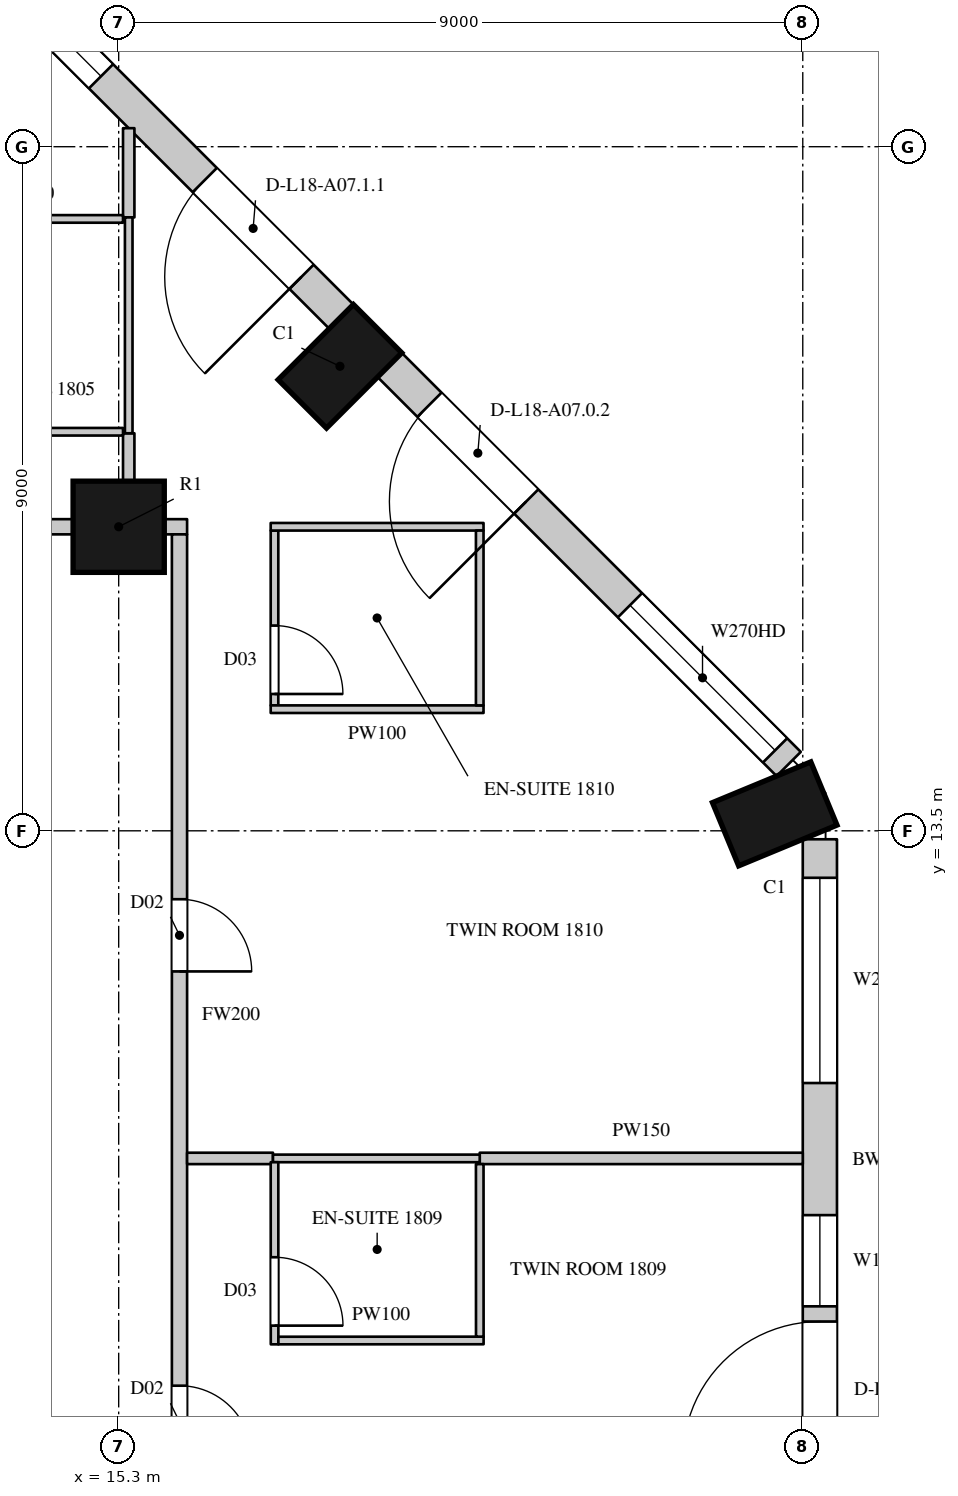
"""IFC4 building model, lengths in metres.
Left out: names, types, materials, properties, quantities, classifications, styles, units other than length and angle.
Written with IfcOpenShell. Run it as: python <this file> out.ifc"""

import sys

from ifc_helpers import new_model, si_unit, direction, frame, frame_2d, origin, origin_2d, place, context, subcontext, project, spatial, rectangle, circle, extrude, element, fill, save


model = new_model("IFC4")
c1 = context("Model", 3, precision=1e-05, world=origin(), true_north=direction((0.0, 1.0)))
c2 = subcontext(c1, "Body", "Model", "MODEL_VIEW")
j1 = project(units=[si_unit("LENGTHUNIT", "METRE"), si_unit("PLANEANGLEUNIT", "RADIAN")], contexts=[c1])
p1 = place(None, origin())
s1 = spatial("IfcSite", under=j1, at=p1, CompositionType="ELEMENT")
p2 = place(p1, origin())
s2 = spatial("IfcBuilding", under=s1, at=p2, CompositionType="ELEMENT")
p3 = place(p2, frame((0.0, 0.0, 95.1)))
s3 = spatial("IfcBuildingStorey", under=s2, at=p3, CompositionType="ELEMENT", Elevation=95.1)
for number, where, z_axis, x_axis in (
    (1, (23.931, 13.723, 0.0), (0.0, 0.0, 1.0), (-0.383, 0.924, 0.0)),
    (2, (18.211, 19.611, 0.0), (0.0, 0.0, 1.0), (-0.707, 0.707, 0.0)),
):
    element("IfcColumn", number, at=place(p3, frame(where, z_axis=z_axis, x_axis=x_axis)), inside=s3, PredefinedType="COLUMN", context=c2, shape_type="SweptSolid", body=[
        extrude(rectangle(XDim=0.9, YDim=1.4, at=origin_2d()), origin(), (0.0, 0.0, 1.0), 3.6),
    ])
p4 = place(p3, frame((15.3, 17.5, 0.0), z_axis=(0.0, 0.0, 1.0), x_axis=(1.0, 0.0, 0.0)))
e3 = element("IfcColumn", 3, at=p4, inside=s3, PredefinedType="COLUMN", context=c2, shape_type="SweptSolid", body=[
    extrude(circle(Radius=0.6, at=origin_2d()), origin(), (0.0, 0.0, 1.0), 3.6),
])
p5 = place(p3, frame((24.525, 4.95, 0.0), z_axis=(0.0, 0.0, 1.0), x_axis=(0.0, 1.0, 0.0)))
e4 = element("IfcWall", 4, at=p5, inside=s3, PredefinedType="SOLIDWALL", context=c2, shape_type="SweptSolid", body=[
    extrude(rectangle(XDim=8.439, YDim=0.45, at=frame_2d((4.219, 0.0))), origin(), (0.0, 0.0, 1.0), 3.3),
])
p6 = place(p5, frame((0.294, 0.0, 0.0)))
e5 = element("IfcOpeningElement", 5, at=p6, cuts=e4, PredefinedType="OPENING", context=c2, shape_type="SweptSolid", body=[
    extrude(rectangle(XDim=1.8, YDim=2.4, at=frame_2d((0.9, 1.2))), frame((0.0, 0.235, 0.0), z_axis=(0.0, -1.0, 0.0), x_axis=(1.0, 0.0, 0.0)), (0.0, 0.0, 1.0), 0.47),
])
p7 = place(p5, frame((2.294, 0.0, 1.05)))
e6 = element("IfcOpeningElement", 6, at=p7, cuts=e4, PredefinedType="OPENING", context=c2, shape_type="SweptSolid", body=[
    extrude(rectangle(XDim=1.2, YDim=2.0, at=frame_2d((0.6, 1.0))), frame((0.0, 0.235, 0.0), z_axis=(0.0, -1.0, 0.0), x_axis=(1.0, 0.0, 0.0)), (0.0, 0.0, 1.0), 0.47),
])
p8 = place(p5, frame((5.232, 0.0, 1.05)))
e7 = element("IfcOpeningElement", 7, at=p8, cuts=e4, PredefinedType="OPENING", context=c2, shape_type="SweptSolid", body=[
    extrude(rectangle(XDim=2.7, YDim=2.0, at=frame_2d((1.35, 1.0))), frame((0.0, 0.235, 0.0), z_axis=(0.0, -1.0, 0.0), x_axis=(1.0, 0.0, 0.0)), (0.0, 0.0, 1.0), 0.47),
])
p9 = place(p3, frame((24.115, 14.379, 0.0), z_axis=(0.0, 0.0, 1.0), x_axis=(-0.707106781187, 0.707106781187, 0.0)))
e8 = element("IfcWall", 8, at=p9, inside=s3, PredefinedType="SOLIDWALL", context=c2, shape_type="SweptSolid", body=[
    extrude(rectangle(XDim=7.424, YDim=0.45, at=frame_2d((3.712, 0.0))), origin(), (0.0, 0.0, 1.0), 3.3),
])
p10 = place(p9, frame((0.253, 0.0, 1.05)))
e9 = element("IfcOpeningElement", 9, at=p10, cuts=e8, PredefinedType="OPENING", context=c2, shape_type="SweptSolid", body=[
    extrude(rectangle(XDim=2.7, YDim=2.0, at=frame_2d((1.35, 1.0))), frame((0.0, 0.235, 0.0), z_axis=(0.0, -1.0, 0.0), x_axis=(1.0, 0.0, 0.0)), (0.0, 0.0, 1.0), 0.47),
])
p11 = place(p9, frame((4.884, 0.0, 0.0)))
e10 = element("IfcOpeningElement", 10, at=p11, cuts=e8, PredefinedType="OPENING", context=c2, shape_type="SweptSolid", body=[
    extrude(rectangle(XDim=1.8, YDim=2.4, at=frame_2d((0.9, 1.2))), frame((0.0, 0.235, 0.0), z_axis=(0.0, -1.0, 0.0), x_axis=(1.0, 0.0, 0.0)), (0.0, 0.0, 1.0), 0.47),
])
p12 = place(p3, frame((18.229, 20.265, 0.0), z_axis=(0.0, 0.0, 1.0), x_axis=(-0.707106781187, 0.707106781187, 0.0)))
e11 = element("IfcWall", 11, at=p12, inside=s3, PredefinedType="SOLIDWALL", context=c2, shape_type="SweptSolid", body=[
    extrude(rectangle(XDim=7.424, YDim=0.45, at=frame_2d((3.712, 0.0))), origin(), (0.0, 0.0, 1.0), 3.3),
])
p13 = place(p12, frame((0.74, 0.0, 0.0)))
e12 = element("IfcOpeningElement", 12, at=p13, cuts=e11, PredefinedType="OPENING", context=c2, shape_type="SweptSolid", body=[
    extrude(rectangle(XDim=1.8, YDim=2.4, at=frame_2d((0.9, 1.2))), frame((0.0, 0.235, 0.0), z_axis=(0.0, -1.0, 0.0), x_axis=(1.0, 0.0, 0.0)), (0.0, 0.0, 1.0), 0.47),
])
p14 = place(p12, frame((4.471, 0.0, 1.05)))
e13 = element("IfcOpeningElement", 13, at=p14, cuts=e11, PredefinedType="OPENING", context=c2, shape_type="SweptSolid", body=[
    extrude(rectangle(XDim=2.7, YDim=2.0, at=frame_2d((1.35, 1.0))), frame((0.0, 0.235, 0.0), z_axis=(0.0, -1.0, 0.0), x_axis=(1.0, 0.0, 0.0)), (0.0, 0.0, 1.0), 0.47),
])
p15 = place(p3, frame((23.15, 16.864, 0.0), z_axis=(0.0, 0.0, 1.0), x_axis=(-0.707106781187, 0.707106781187, 0.0)))
e14 = element("IfcWall", 14, at=p15, inside=s3, PredefinedType="SOLIDWALL", context=c2, shape_type="SweptSolid", body=[
    extrude(rectangle(XDim=1.445, YDim=0.45, at=frame_2d((0.722, 0.0))), origin(), (0.0, 0.0, 1.0), 0.6),
])
p16 = place(p3, frame((19.937, 20.078, 0.0), z_axis=(0.0, 0.0, 1.0), x_axis=(-0.707106781187, 0.707106781187, 0.0)))
e15 = element("IfcWall", 15, at=p16, inside=s3, PredefinedType="SOLIDWALL", context=c2, shape_type="SweptSolid", body=[
    extrude(rectangle(XDim=1.781, YDim=0.45, at=frame_2d((0.89, 0.0))), origin(), (0.0, 0.0, 1.0), 0.6),
])
p17 = place(p3, frame((16.486, 23.529, 0.0), z_axis=(0.0, 0.0, 1.0), x_axis=(-0.707022305137, 0.707191247145, 0.0)))
e16 = element("IfcWall", 16, at=p17, inside=s3, PredefinedType="SOLIDWALL", context=c2, shape_type="SweptSolid", body=[
    extrude(rectangle(XDim=1.445, YDim=0.45, at=frame_2d((0.723, 0.0))), origin(), (0.0, 0.0, 1.0), 0.6),
])
p18 = place(p3, frame((6.9, 17.5, 0.0), z_axis=(0.0, 0.0, 1.0), x_axis=(1.0, 0.0, 0.0)))
e17 = element("IfcWall", 17, at=p18, inside=s3, PredefinedType="PARTITIONING", context=c2, shape_type="SweptSolid", body=[
    extrude(rectangle(XDim=7.8, YDim=0.2, at=frame_2d((3.9, 0.0))), origin(), (0.0, 0.0, 1.0), 2.75),
])
p19 = place(p18, frame((1.45, 0.0, 0.0)))
e18 = element("IfcOpeningElement", 18, at=p19, cuts=e17, PredefinedType="OPENING", context=c2, shape_type="SweptSolid", body=[
    extrude(rectangle(XDim=1.1, YDim=2.4, at=frame_2d((0.55, 1.2))), frame((0.0, 0.11, 0.0), z_axis=(0.0, -1.0, 0.0), x_axis=(1.0, 0.0, 0.0)), (0.0, 0.0, 1.0), 0.22),
])
p20 = place(p3, frame((15.9, 17.5, 0.0), z_axis=(0.0, 0.0, 1.0), x_axis=(1.0, 0.0, 0.0)))
e19 = element("IfcWall", 19, at=p20, inside=s3, PredefinedType="PARTITIONING", context=c2, shape_type="SweptSolid", body=[
    extrude(rectangle(XDim=0.3, YDim=0.2, at=frame_2d((0.15, 0.0))), origin(), (0.0, 0.0, 1.0), 3.3),
])
p21 = place(p3, frame((16.1, 4.75, 0.0), z_axis=(0.0, 0.0, 1.0), x_axis=(0.0, 1.0, 0.0)))
e20 = element("IfcWall", 20, at=p21, inside=s3, PredefinedType="PARTITIONING", context=c2, shape_type="SweptSolid", body=[
    extrude(rectangle(XDim=12.65, YDim=0.2, at=frame_2d((6.325, 0.0))), origin(), (0.0, 0.0, 1.0), 3.3),
])
p22 = place(p21, frame((0.5, 0.0, 0.0)))
e21 = element("IfcOpeningElement", 21, at=p22, cuts=e20, PredefinedType="OPENING", context=c2, shape_type="SweptSolid", body=[
    extrude(rectangle(XDim=0.95, YDim=2.2, at=frame_2d((0.475, 1.1))), frame((0.0, 0.11, 0.0), z_axis=(0.0, -1.0, 0.0), x_axis=(1.0, 0.0, 0.0)), (0.0, 0.0, 1.0), 0.22),
])
p23 = place(p21, frame((6.9, 0.0, 0.0)))
e22 = element("IfcOpeningElement", 22, at=p23, cuts=e20, PredefinedType="OPENING", context=c2, shape_type="SweptSolid", body=[
    extrude(rectangle(XDim=0.95, YDim=2.2, at=frame_2d((0.475, 1.1))), frame((0.0, 0.11, 0.0), z_axis=(0.0, -1.0, 0.0), x_axis=(1.0, 0.0, 0.0)), (0.0, 0.0, 1.0), 0.22),
])
p24 = place(p3, frame((15.432, 18.094, 0.0), z_axis=(0.0, 0.0, 1.0), x_axis=(0.0, 1.0, 0.0)))
e23 = element("IfcWall", 23, at=p24, inside=s3, PredefinedType="PARTITIONING", context=c2, shape_type="SweptSolid", body=[
    extrude(rectangle(XDim=0.636, YDim=0.15, at=frame_2d((0.318, 0.0))), origin(), (0.0, 0.0, 1.0), 3.3),
])
p25 = place(p3, frame((15.432, 21.57, 0.0), z_axis=(0.0, 0.0, 1.0), x_axis=(0.0, 1.0, 0.0)))
e24 = element("IfcWall", 24, at=p25, inside=s3, PredefinedType="PARTITIONING", context=c2, shape_type="SweptSolid", body=[
    extrude(rectangle(XDim=1.174, YDim=0.15, at=frame_2d((0.587, 0.0))), origin(), (0.0, 0.0, 1.0), 3.3),
])
p26 = place(p3, frame((16.2, 9.19, 0.0), z_axis=(0.0, 0.0, 1.0), x_axis=(1.0, 0.0, 0.0)))
e25 = element("IfcWall", 25, at=p26, inside=s3, PredefinedType="PARTITIONING", context=c2, shape_type="SweptSolid", body=[
    extrude(rectangle(XDim=1.13, YDim=0.15, at=frame_2d((0.565, 0.0))), origin(), (0.0, 0.0, 1.0), 2.65),
])
p27 = place(p3, frame((20.05, 9.19, 0.0), z_axis=(0.0, 0.0, 1.0), x_axis=(1.0, 0.0, 0.0)))
e26 = element("IfcWall", 26, at=p27, inside=s3, PredefinedType="PARTITIONING", context=c2, shape_type="SweptSolid", body=[
    extrude(rectangle(XDim=4.25, YDim=0.15, at=frame_2d((2.125, 0.0))), origin(), (0.0, 0.0, 1.0), 2.65),
])
for number, where, z_axis, x_axis in (
    (27, (12.786, 18.75, 0.0), (0.0, 0.0, 1.0), (1.0, 0.0, 0.0)),
    (28, (12.786, 21.55, 0.0), (0.0, 0.0, 1.0), (1.0, 0.0, 0.0)),
):
    element("IfcWall", number, at=place(p3, frame(where, z_axis=z_axis, x_axis=x_axis)), inside=s3, PredefinedType="PARTITIONING", context=c2, shape_type="SweptSolid", body=[
        extrude(rectangle(XDim=2.571, YDim=0.1, at=frame_2d((1.286, 0.0))), origin(), (0.0, 0.0, 1.0), 3.3),
    ])
p28 = place(p3, frame((15.432, 18.73, 0.0), z_axis=(0.0, 0.0, 1.0), x_axis=(0.0, 1.0, 0.0)))
e29 = element("IfcWall", 29, at=p28, inside=s3, PredefinedType="PARTITIONING", context=c2, shape_type="SweptSolid", body=[
    extrude(rectangle(XDim=2.84, YDim=0.1, at=frame_2d((1.42, 0.0))), origin(), (0.0, 0.0, 1.0), 3.3),
])
p29 = place(p3, frame((17.33, 9.19, 0.0), z_axis=(0.0, 0.0, 1.0), x_axis=(1.0, 0.0, 0.0)))
e30 = element("IfcWall", 30, at=p29, inside=s3, PredefinedType="PARTITIONING", context=c2, shape_type="SweptSolid", body=[
    extrude(rectangle(XDim=2.72, YDim=0.1, at=frame_2d((1.36, 0.0))), origin(), (0.0, 0.0, 1.0), 2.65),
])
p30 = place(p3, frame((17.35, 9.14, 0.0), z_axis=(0.0, 0.0, 1.0), x_axis=(0.000407580973, -0.999999916939, 0.0)))
e31 = element("IfcWall", 31, at=p30, inside=s3, PredefinedType="PARTITIONING", context=c2, shape_type="SweptSolid", body=[
    extrude(rectangle(XDim=2.396, YDim=0.1, at=frame_2d((1.198, 0.0))), origin(), (0.0, 0.0, 1.0), 3.3),
])
p31 = place(p30, frame((1.25, 0.0, 0.0)))
e32 = element("IfcOpeningElement", 32, at=p31, cuts=e31, PredefinedType="OPENING", context=c2, shape_type="SweptSolid", body=[
    extrude(rectangle(XDim=0.9, YDim=2.2, at=frame_2d((0.45, 1.1))), frame((0.0, 0.06, 0.0), z_axis=(0.0, -1.0, 0.0), x_axis=(1.0, 0.0, 0.0)), (0.0, 0.0, 1.0), 0.12),
])
p32 = place(p3, frame((17.35, 15.15, 0.0), z_axis=(0.0, 0.0, 1.0), x_axis=(0.0, 1.0, 0.0)))
e33 = element("IfcWall", 33, at=p32, inside=s3, PredefinedType="PARTITIONING", context=c2, shape_type="SweptSolid", body=[
    extrude(rectangle(XDim=2.3, YDim=0.1, at=frame_2d((1.15, 0.0))), origin(), (0.0, 0.0, 1.0), 3.3),
])
p33 = place(p32, frame((0.15, 0.0, 0.0)))
e34 = element("IfcOpeningElement", 34, at=p33, cuts=e33, PredefinedType="OPENING", context=c2, shape_type="SweptSolid", body=[
    extrude(rectangle(XDim=0.9, YDim=2.2, at=frame_2d((0.45, 1.1))), frame((0.0, 0.06, 0.0), z_axis=(0.0, -1.0, 0.0), x_axis=(1.0, 0.0, 0.0)), (0.0, 0.0, 1.0), 0.12),
])
for number, where, z_axis, x_axis in (
    (35, (17.3, 15.1, 0.0), (0.0, 0.0, 1.0), (1.0, 0.0, 0.0)),
    (36, (17.3, 17.5, 0.0), (0.0, 0.0, 1.0), (1.0, 0.0, 0.0)),
):
    element("IfcWall", number, at=place(p3, frame(where, z_axis=z_axis, x_axis=x_axis)), inside=s3, PredefinedType="PARTITIONING", context=c2, shape_type="SweptSolid", body=[
        extrude(rectangle(XDim=2.8, YDim=0.1, at=frame_2d((1.4, 0.0))), origin(), (0.0, 0.0, 1.0), 3.3),
    ])
p34 = place(p3, frame((17.401, 6.794, 0.0), z_axis=(0.0, 0.0, 1.0), x_axis=(0.9999999346, 0.000361663629, 0.0)))
e37 = element("IfcWall", 37, at=p34, inside=s3, PredefinedType="PARTITIONING", context=c2, shape_type="SweptSolid", body=[
    extrude(rectangle(XDim=2.7, YDim=0.1, at=frame_2d((1.35, 0.0))), origin(), (0.0, 0.0, 1.0), 3.3),
])
p35 = place(p3, frame((20.05, 9.115, 0.0), z_axis=(0.0, 0.0, 1.0), x_axis=(0.000430200003, -0.999999907464, 0.0)))
e38 = element("IfcWall", 38, at=p35, inside=s3, PredefinedType="PARTITIONING", context=c2, shape_type="SweptSolid", body=[
    extrude(rectangle(XDim=2.27, YDim=0.1, at=frame_2d((1.135, 0.0))), origin(), (0.0, 0.0, 1.0), 3.3),
])
p36 = place(p3, frame((20.05, 15.15, 0.0), z_axis=(0.0, 0.0, 1.0), x_axis=(0.0, 1.0, 0.0)))
e39 = element("IfcWall", 39, at=p36, inside=s3, PredefinedType="PARTITIONING", context=c2, shape_type="SweptSolid", body=[
    extrude(rectangle(XDim=2.3, YDim=0.1, at=frame_2d((1.15, 0.0))), origin(), (0.0, 0.0, 1.0), 3.3),
])
p37 = place(p6, origin())
e40 = element("IfcDoor", 40, at=p37, inside=s3, OperationType="SLIDING_TO_LEFT", PredefinedType="DOOR", context=c2, shape_type="SweptSolid", body=[
    extrude(rectangle(XDim=1.8, YDim=2.4, at=frame_2d((0.9, 1.2))), frame((0.0, 0.13, 0.0), z_axis=(0.0, -1.0, 0.0), x_axis=(1.0, 0.0, 0.0)), (0.0, 0.0, 1.0), 0.05),
])
fill(e5, e40)
p38 = place(p7, origin())
e41 = element("IfcWindow", 41, at=p38, inside=s3, PartitioningType="SINGLE_PANEL", PredefinedType="WINDOW", context=c2, shape_type="SweptSolid", body=[
    extrude(rectangle(XDim=1.2, YDim=2.0, at=frame_2d((0.6, 1.0))), frame((0.0, 0.135, 0.0), z_axis=(0.0, -1.0, 0.0), x_axis=(1.0, 0.0, 0.0)), (0.0, 0.0, 1.0), 0.06),
])
fill(e6, e41)
p39 = place(p8, origin())
e42 = element("IfcWindow", 42, at=p39, inside=s3, PartitioningType="SINGLE_PANEL", PredefinedType="WINDOW", context=c2, shape_type="SweptSolid", body=[
    extrude(rectangle(XDim=2.7, YDim=2.0, at=frame_2d((1.35, 1.0))), frame((0.0, 0.135, 0.0), z_axis=(0.0, -1.0, 0.0), x_axis=(1.0, 0.0, 0.0)), (0.0, 0.0, 1.0), 0.06),
])
fill(e7, e42)
p40 = place(p10, origin())
e43 = element("IfcWindow", 43, at=p40, inside=s3, PartitioningType="SINGLE_PANEL", PredefinedType="WINDOW", context=c2, shape_type="SweptSolid", body=[
    extrude(rectangle(XDim=2.7, YDim=2.0, at=frame_2d((1.35, 1.0))), frame((0.0, 0.135, 0.0), z_axis=(0.0, -1.0, 0.0), x_axis=(1.0, 0.0, 0.0)), (0.0, 0.0, 1.0), 0.06),
])
fill(e9, e43)
p41 = place(p11, origin())
e44 = element("IfcDoor", 44, at=p41, inside=s3, OperationType="SLIDING_TO_LEFT", PredefinedType="DOOR", context=c2, shape_type="SweptSolid", body=[
    extrude(rectangle(XDim=1.8, YDim=2.4, at=frame_2d((0.9, 1.2))), frame((0.0, 0.13, 0.0), z_axis=(0.0, -1.0, 0.0), x_axis=(1.0, 0.0, 0.0)), (0.0, 0.0, 1.0), 0.05),
])
fill(e10, e44)
p42 = place(p13, origin())
e45 = element("IfcDoor", 45, at=p42, inside=s3, OperationType="SLIDING_TO_LEFT", PredefinedType="DOOR", context=c2, shape_type="SweptSolid", body=[
    extrude(rectangle(XDim=1.8, YDim=2.4, at=frame_2d((0.9, 1.2))), frame((0.0, 0.13, 0.0), z_axis=(0.0, -1.0, 0.0), x_axis=(1.0, 0.0, 0.0)), (0.0, 0.0, 1.0), 0.05),
])
fill(e12, e45)
p43 = place(p14, origin())
e46 = element("IfcWindow", 46, at=p43, inside=s3, PartitioningType="SINGLE_PANEL", PredefinedType="WINDOW", context=c2, shape_type="SweptSolid", body=[
    extrude(rectangle(XDim=2.7, YDim=2.0, at=frame_2d((1.35, 1.0))), frame((0.0, 0.135, 0.0), z_axis=(0.0, -1.0, 0.0), x_axis=(1.0, 0.0, 0.0)), (0.0, 0.0, 1.0), 0.06),
])
fill(e13, e46)
p44 = place(p22, origin())
e47 = element("IfcDoor", 47, at=p44, inside=s3, OperationType="SINGLE_SWING_RIGHT", PredefinedType="DOOR", context=c2, shape_type="SweptSolid", body=[
    extrude(rectangle(XDim=0.95, YDim=2.2, at=frame_2d((0.475, 1.1))), frame((0.0, 0.025, 0.0), z_axis=(0.0, -1.0, 0.0), x_axis=(1.0, 0.0, 0.0)), (0.0, 0.0, 1.0), 0.05),
])
fill(e21, e47)
p45 = place(p31, origin())
e48 = element("IfcDoor", 48, at=p45, inside=s3, OperationType="SINGLE_SWING_RIGHT", PredefinedType="DOOR", context=c2, shape_type="SweptSolid", body=[
    extrude(rectangle(XDim=0.9, YDim=2.2, at=frame_2d((0.45, 1.1))), frame((0.0, 0.025, 0.0), z_axis=(0.0, -1.0, 0.0), x_axis=(1.0, 0.0, 0.0)), (0.0, 0.0, 1.0), 0.05),
])
fill(e32, e48)
p46 = place(p23, origin())
e49 = element("IfcDoor", 49, at=p46, inside=s3, OperationType="SINGLE_SWING_RIGHT", PredefinedType="DOOR", context=c2, shape_type="SweptSolid", body=[
    extrude(rectangle(XDim=0.95, YDim=2.2, at=frame_2d((0.475, 1.1))), frame((0.0, 0.025, 0.0), z_axis=(0.0, -1.0, 0.0), x_axis=(1.0, 0.0, 0.0)), (0.0, 0.0, 1.0), 0.05),
])
fill(e22, e49)
p47 = place(p33, origin())
e50 = element("IfcDoor", 50, at=p47, inside=s3, OperationType="SINGLE_SWING_RIGHT", PredefinedType="DOOR", context=c2, shape_type="SweptSolid", body=[
    extrude(rectangle(XDim=0.9, YDim=2.2, at=frame_2d((0.45, 1.1))), frame((0.0, 0.025, 0.0), z_axis=(0.0, -1.0, 0.0), x_axis=(1.0, 0.0, 0.0)), (0.0, 0.0, 1.0), 0.05),
])
fill(e34, e50)
save(model, sys.argv[1])
